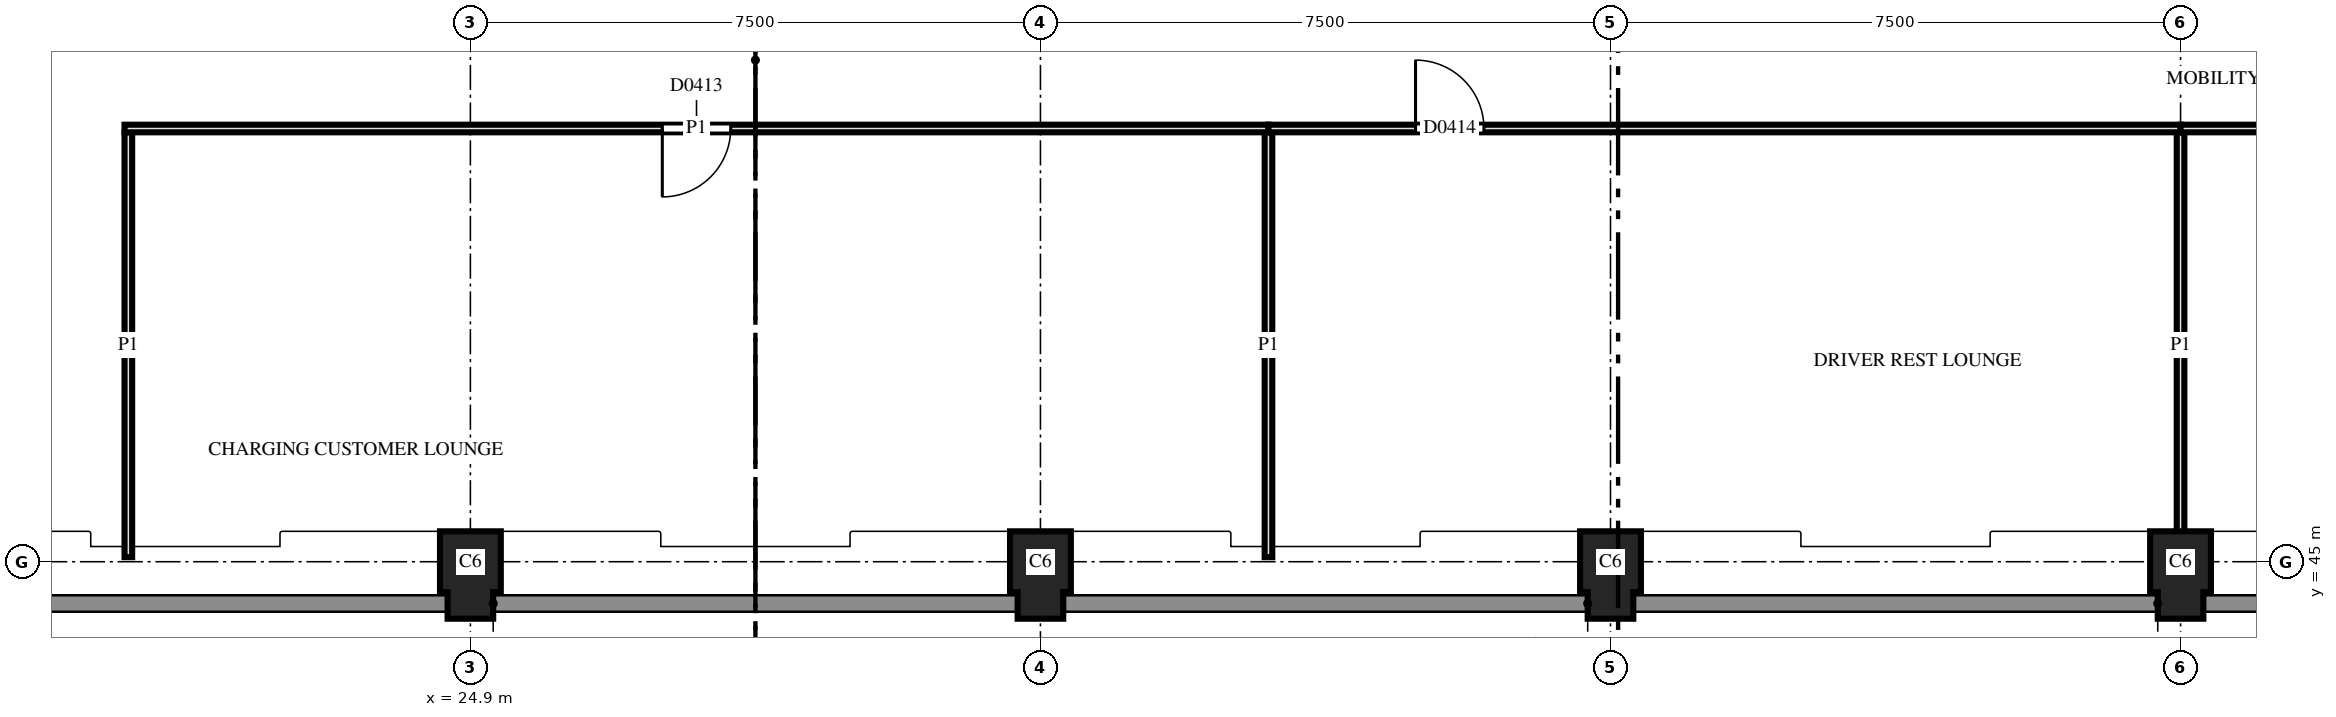
"""IFC4 building model, lengths in metres.
Left out: names, types, materials, properties, quantities, classifications, styles, units other than length and angle.
Written with IfcOpenShell. Run it as: python <this file> out.ifc"""

import sys

from ifc_helpers import new_model, si_unit, direction, frame, frame_2d, origin, place, context, subcontext, project, spatial, polyline, rectangle, outline, extrude, element, fill, save


model = new_model("IFC4")
c1 = context("Model", 3, precision=1e-05, world=origin(), true_north=direction((0.0, 1.0)))
c2 = subcontext(c1, "Body", "Model", "MODEL_VIEW")
j1 = project(units=[si_unit("LENGTHUNIT", "METRE"), si_unit("PLANEANGLEUNIT", "RADIAN")], contexts=[c1])
p1 = place(None, origin())
s1 = spatial("IfcSite", under=j1, at=p1, CompositionType="ELEMENT")
p2 = place(p1, origin())
s2 = spatial("IfcBuilding", under=s1, at=p2, CompositionType="ELEMENT")
p3 = place(p2, frame((0.0, 0.0, 15.6)))
s3 = spatial("IfcBuildingStorey", under=s2, at=p3, CompositionType="ELEMENT", Elevation=15.6)
for number, where, z_axis, x_axis in (
    (1, (24.9, 45.0, 0.0), (0.0, 0.0, 1.0), (0.0, -1.0, 0.0)),
    (2, (32.4, 45.0, 0.0), (0.0, 0.0, 1.0), (0.0, -1.0, 0.0)),
    (3, (39.9, 45.0, 0.0), (0.0, 0.0, 1.0), (0.0, -1.0, 0.0)),
    (4, (47.4, 45.0, 0.0), (0.0, 0.0, 1.0), (0.0, -1.0, 0.0)),
):
    element("IfcColumn", number, at=place(p3, frame(where, z_axis=z_axis, x_axis=x_axis)), inside=s3, PredefinedType="COLUMN", context=c2, shape_type="SweptSolid", body=[
        extrude(outline(polyline([(-0.4, -0.4), (0.4, -0.4), (0.4, -0.3), (0.75, -0.3), (0.75, 0.3), (0.4, 0.3), (0.4, 0.4), (-0.4, 0.4), (-0.4, -0.4)])), origin(), (0.0, 0.0, 1.0), 3.7),
    ])
for number, where, z_axis, x_axis in (
    (5, (35.4, 45.06, 0.0), (0.0, 0.0, 1.0), (0.0, 1.0, 0.0)),
    (6, (47.4, 45.06, 0.0), (0.0, 0.0, 1.0), (0.0, 1.0, 0.0)),
    (7, (20.4, 50.65, 0.0), (0.0, 0.0, 1.0), (0.0, -1.0, 0.0)),
):
    element("IfcWall", number, at=place(p3, frame(where, z_axis=z_axis, x_axis=x_axis)), inside=s3, PredefinedType="PARTITIONING", context=c2, shape_type="SweptSolid", body=[
        extrude(rectangle(XDim=5.59, YDim=0.1, at=frame_2d((2.795, 0.0))), origin(), (0.0, 0.0, 1.0), 2.88),
    ])
p4 = place(p3, frame((35.4, 50.7, 0.0), z_axis=(0.0, 0.0, 1.0), x_axis=(-1.0, 0.0, 0.0)))
e8 = element("IfcWall", 8, at=p4, inside=s3, PredefinedType="PARTITIONING", context=c2, shape_type="SweptSolid", body=[
    extrude(rectangle(XDim=15.05, YDim=0.1, at=frame_2d((7.525, 0.0))), origin(), (0.0, 0.0, 1.0), 2.88),
])
p5 = place(p4, frame((7.075, 0.0, 0.0)))
e9 = element("IfcOpeningElement", 9, at=p5, cuts=e8, PredefinedType="OPENING", context=c2, shape_type="SweptSolid", body=[
    extrude(rectangle(XDim=0.9, YDim=2.1, at=frame_2d((0.45, 1.05))), frame((0.0, 0.06, 0.0), z_axis=(0.0, -1.0, 0.0), x_axis=(1.0, 0.0, 0.0)), (0.0, 0.0, 1.0), 0.12),
])
p6 = place(p3, frame((47.4, 50.7, 0.0), z_axis=(0.0, 0.0, 1.0), x_axis=(-1.0, 0.0, 0.0)))
e10 = element("IfcWall", 10, at=p6, inside=s3, PredefinedType="PARTITIONING", context=c2, shape_type="SweptSolid", body=[
    extrude(rectangle(XDim=12.0, YDim=0.1, at=frame_2d((6.0, 0.0))), origin(), (0.0, 0.0, 1.0), 2.88),
])
p7 = place(p6, frame((9.165, 0.0, 0.0)))
e11 = element("IfcOpeningElement", 11, at=p7, cuts=e10, PredefinedType="OPENING", context=c2, shape_type="SweptSolid", body=[
    extrude(rectangle(XDim=0.9, YDim=2.1, at=frame_2d((0.45, 1.05))), frame((0.0, 0.06, 0.0), z_axis=(0.0, -1.0, 0.0), x_axis=(1.0, 0.0, 0.0)), (0.0, 0.0, 1.0), 0.12),
])
p8 = place(p3, frame((57.4, 50.7, 0.0), z_axis=(0.0, 0.0, 1.0), x_axis=(-1.0, 0.0, 0.0)))
e12 = element("IfcWall", 12, at=p8, inside=s3, PredefinedType="PARTITIONING", context=c2, shape_type="SweptSolid", body=[
    extrude(rectangle(XDim=10.0, YDim=0.1, at=frame_2d((5.0, 0.0))), origin(), (0.0, 0.0, 1.0), 2.88),
])
p9 = place(p8, frame((4.55, 0.0, 0.0)))
e13 = element("IfcOpeningElement", 13, at=p9, cuts=e12, PredefinedType="OPENING", context=c2, shape_type="SweptSolid", body=[
    extrude(rectangle(XDim=0.9, YDim=2.1, at=frame_2d((0.45, 1.05))), frame((0.0, 0.06, 0.0), z_axis=(0.0, -1.0, 0.0), x_axis=(1.0, 0.0, 0.0)), (0.0, 0.0, 1.0), 0.12),
])
p10 = place(p5, origin())
e14 = element("IfcDoor", 14, at=p10, inside=s3, OperationType="SINGLE_SWING_LEFT", PredefinedType="DOOR", context=c2, shape_type="SweptSolid", body=[
    extrude(rectangle(XDim=0.9, YDim=2.1, at=frame_2d((0.45, 1.05))), frame((0.0, 0.025, 0.0), z_axis=(0.0, -1.0, 0.0), x_axis=(1.0, 0.0, 0.0)), (0.0, 0.0, 1.0), 0.05),
])
fill(e9, e14)
p11 = place(p7, origin())
e15 = element("IfcDoor", 15, at=p11, inside=s3, OperationType="SINGLE_SWING_RIGHT", PredefinedType="DOOR", context=c2, shape_type="SweptSolid", body=[
    extrude(rectangle(XDim=0.9, YDim=2.1, at=frame_2d((0.45, 1.05))), frame((0.0, 0.025, 0.0), z_axis=(0.0, -1.0, 0.0), x_axis=(1.0, 0.0, 0.0)), (0.0, 0.0, 1.0), 0.05),
])
fill(e11, e15)
save(model, sys.argv[1])
